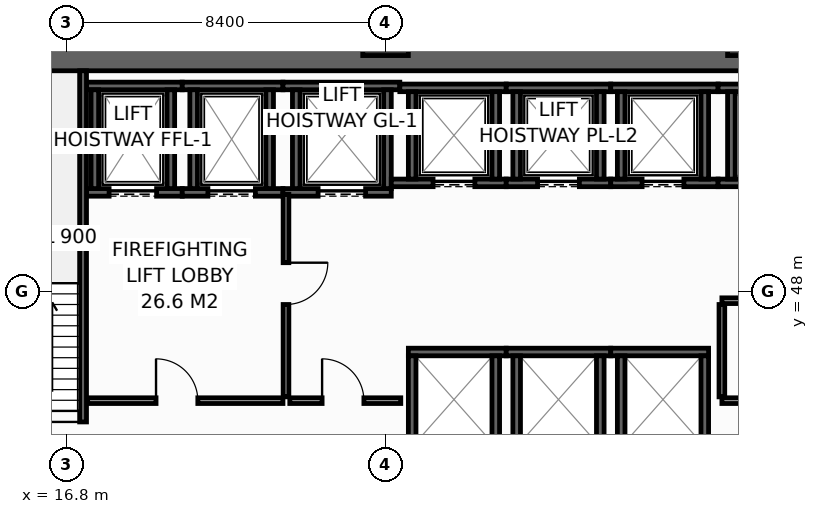
"""IFC4 building model, lengths in metres.
Left out: names, types, materials, properties, quantities, classifications, styles, units other than length and angle.
Written with IfcOpenShell. Run it as: python <this file> out.ifc"""

import sys

from ifc_helpers import new_model, si_unit, direction, frame, frame_2d, origin, origin_2d, place, context, subcontext, project, spatial, rectangle, hollow_rectangle, extrude, element, fill, save


model = new_model("IFC4")
c1 = context("Model", 3, precision=1e-05, world=origin(), true_north=direction((0.0, 1.0)))
c2 = subcontext(c1, "Body", "Model", "MODEL_VIEW")
j1 = project(units=[si_unit("LENGTHUNIT", "METRE"), si_unit("PLANEANGLEUNIT", "RADIAN")], contexts=[c1])
p1 = place(None, origin())
s1 = spatial("IfcSite", under=j1, at=p1, CompositionType="ELEMENT")
p2 = place(p1, origin())
s2 = spatial("IfcBuilding", under=s1, at=p2, CompositionType="ELEMENT")
p3 = place(p2, frame((0.0, 0.0, 82.4)))
s3 = spatial("IfcBuildingStorey", under=s2, at=p3, CompositionType="ELEMENT", Elevation=82.4)
p4 = place(p3, frame((13.5, 54.1, 0.0), z_axis=(0.0, 0.0, 1.0), x_axis=(1.0, 0.0, 0.0)))
e1 = element("IfcWall", 1, at=p4, inside=s3, PredefinedType="SHEAR", context=c2, shape_type="SweptSolid", body=[
    extrude(rectangle(XDim=32.9, YDim=0.6, at=frame_2d((16.45, 0.0))), origin(), (0.0, 0.0, 1.0), 3.95),
])
for number, where, z_axis, x_axis in (
    (2, (25.2, 54.8, 0.0), (0.0, 0.0, 1.0), (1.0, 0.0, 0.0)),
    (3, (34.8, 54.8, 0.0), (0.0, 0.0, 1.0), (1.0, 0.0, 0.0)),
):
    element("IfcColumn", number, at=place(p3, frame(where, z_axis=z_axis, x_axis=x_axis)), inside=s3, PredefinedType="COLUMN", context=c2, shape_type="SweptSolid", body=[
        extrude(hollow_rectangle(XDim=1.2, YDim=1.2, WallThickness=0.055, at=origin_2d()), origin(), (0.0, 0.0, 1.0), 4.4),
    ])
p5 = place(p3, frame((17.33, 50.6, 0.0), z_axis=(0.0, 0.0, 1.0), x_axis=(1.0, 0.0, 0.0)))
e4 = element("IfcWall", 4, at=p5, inside=s3, PredefinedType="SHEAR", context=c2, shape_type="SweptSolid", body=[
    extrude(rectangle(XDim=2.52, YDim=0.2, at=frame_2d((1.26, 0.0))), origin(), (0.0, 0.0, 1.0), 3.95),
])
p6 = place(p5, frame((0.595, 0.0, 0.0)))
e5 = element("IfcOpeningElement", 5, at=p6, cuts=e4, PredefinedType="OPENING", context=c2, shape_type="SweptSolid", body=[
    extrude(rectangle(XDim=1.25, YDim=2.3, at=frame_2d((0.625, 1.15))), frame((0.0, 0.11, 0.0), z_axis=(0.0, -1.0, 0.0), x_axis=(1.0, 0.0, 0.0)), (0.0, 0.0, 1.0), 0.22),
])
p7 = place(p3, frame((17.33, 53.4, 0.0), z_axis=(0.0, 0.0, 1.0), x_axis=(1.0, 0.0, 0.0)))
e6 = element("IfcWall", 6, at=p7, inside=s3, PredefinedType="SHEAR", context=c2, shape_type="SweptSolid", body=[
    extrude(rectangle(XDim=2.52, YDim=0.2, at=frame_2d((1.26, 0.0))), origin(), (0.0, 0.0, 1.0), 3.95),
])
for number, where, z_axis, x_axis in (
    (7, (17.55, 50.7, 0.0), (0.0, 0.0, 1.0), (0.0, 1.0, 0.0)),
    (8, (19.55, 50.7, 0.0), (0.0, 0.0, 1.0), (0.0, 1.0, 0.0)),
):
    element("IfcWall", number, at=place(p3, frame(where, z_axis=z_axis, x_axis=x_axis)), inside=s3, PredefinedType="SHEAR", context=c2, shape_type="SweptSolid", body=[
        extrude(rectangle(XDim=2.6, YDim=0.2, at=frame_2d((1.3, 0.0))), origin(), (0.0, 0.0, 1.0), 3.95),
    ])
p8 = place(p3, frame((19.85, 50.6, 0.0), z_axis=(0.0, 0.0, 1.0), x_axis=(1.0, 0.0, 0.0)))
e9 = element("IfcWall", 9, at=p8, inside=s3, PredefinedType="SHEAR", context=c2, shape_type="SweptSolid", body=[
    extrude(rectangle(XDim=2.65, YDim=0.2, at=frame_2d((1.325, 0.0))), origin(), (0.0, 0.0, 1.0), 3.95),
])
p9 = place(p8, frame((0.675, 0.0, 0.0)))
e10 = element("IfcOpeningElement", 10, at=p9, cuts=e9, PredefinedType="OPENING", context=c2, shape_type="SweptSolid", body=[
    extrude(rectangle(XDim=1.25, YDim=2.3, at=frame_2d((0.625, 1.15))), frame((0.0, 0.11, 0.0), z_axis=(0.0, -1.0, 0.0), x_axis=(1.0, 0.0, 0.0)), (0.0, 0.0, 1.0), 0.22),
])
p10 = place(p3, frame((19.85, 53.4, 0.0), z_axis=(0.0, 0.0, 1.0), x_axis=(1.0, 0.0, 0.0)))
e11 = element("IfcWall", 11, at=p10, inside=s3, PredefinedType="SHEAR", context=c2, shape_type="SweptSolid", body=[
    extrude(rectangle(XDim=2.65, YDim=0.2, at=frame_2d((1.325, 0.0))), origin(), (0.0, 0.0, 1.0), 3.95),
])
for number, where, z_axis, x_axis in (
    (12, (20.15, 50.7, 0.0), (0.0, 0.0, 1.0), (0.0, 1.0, 0.0)),
    (13, (22.15, 50.7, 0.0), (0.0, 0.0, 1.0), (0.0, 1.0, 0.0)),
):
    element("IfcWall", number, at=place(p3, frame(where, z_axis=z_axis, x_axis=x_axis)), inside=s3, PredefinedType="SHEAR", context=c2, shape_type="SweptSolid", body=[
        extrude(rectangle(XDim=2.6, YDim=0.2, at=frame_2d((1.3, 0.0))), origin(), (0.0, 0.0, 1.0), 3.95),
    ])
p11 = place(p3, frame((22.5, 50.6, 0.0), z_axis=(0.0, 0.0, 1.0), x_axis=(1.0, 0.0, 0.0)))
e14 = element("IfcWall", 14, at=p11, inside=s3, PredefinedType="SHEAR", context=c2, shape_type="SweptSolid", body=[
    extrude(rectangle(XDim=2.85, YDim=0.2, at=frame_2d((1.425, 0.0))), origin(), (0.0, 0.0, 1.0), 3.95),
])
p12 = place(p11, frame((0.925, 0.0, 0.0)))
e15 = element("IfcOpeningElement", 15, at=p12, cuts=e14, PredefinedType="OPENING", context=c2, shape_type="SweptSolid", body=[
    extrude(rectangle(XDim=1.25, YDim=2.3, at=frame_2d((0.625, 1.15))), frame((0.0, 0.11, 0.0), z_axis=(0.0, -1.0, 0.0), x_axis=(1.0, 0.0, 0.0)), (0.0, 0.0, 1.0), 0.22),
])
p13 = place(p3, frame((22.5, 53.4, 0.0), z_axis=(0.0, 0.0, 1.0), x_axis=(1.0, 0.0, 0.0)))
e16 = element("IfcWall", 16, at=p13, inside=s3, PredefinedType="SHEAR", context=c2, shape_type="SweptSolid", body=[
    extrude(rectangle(XDim=3.075, YDim=0.2, at=frame_2d((1.538, 0.0))), origin(), (0.0, 0.0, 1.0), 3.95),
])
for number, where, z_axis, x_axis in (
    (17, (22.85, 50.7, 0.0), (0.0, 0.0, 1.0), (0.0, 1.0, 0.0)),
    (18, (25.25, 50.7, 0.0), (0.0, 0.0, 1.0), (0.0, 1.0, 0.0)),
):
    element("IfcWall", number, at=place(p3, frame(where, z_axis=z_axis, x_axis=x_axis)), inside=s3, PredefinedType="SHEAR", context=c2, shape_type="SweptSolid", body=[
        extrude(rectangle(XDim=2.6, YDim=0.2, at=frame_2d((1.3, 0.0))), origin(), (0.0, 0.0, 1.0), 3.95),
    ])
p14 = place(p3, frame((25.35, 50.85, 0.0), z_axis=(0.0, 0.0, 1.0), x_axis=(1.0, 0.0, 0.0)))
e19 = element("IfcWall", 19, at=p14, inside=s3, PredefinedType="SHEAR", context=c2, shape_type="SweptSolid", body=[
    extrude(rectangle(XDim=3.025, YDim=0.2, at=frame_2d((1.512, 0.0))), origin(), (0.0, 0.0, 1.0), 3.95),
])
p15 = place(p14, frame((1.1, 0.0, 0.0)))
e20 = element("IfcOpeningElement", 20, at=p15, cuts=e19, PredefinedType="OPENING", context=c2, shape_type="SweptSolid", body=[
    extrude(rectangle(XDim=1.1, YDim=2.2, at=frame_2d((0.55, 1.1))), frame((0.0, 0.11, 0.0), z_axis=(0.0, -1.0, 0.0), x_axis=(1.0, 0.0, 0.0)), (0.0, 0.0, 1.0), 0.22),
])
p16 = place(p3, frame((25.575, 53.35, 0.0), z_axis=(0.0, 0.0, 1.0), x_axis=(1.0, 0.0, 0.0)))
e21 = element("IfcWall", 21, at=p16, inside=s3, PredefinedType="SHEAR", context=c2, shape_type="SweptSolid", body=[
    extrude(rectangle(XDim=2.8, YDim=0.2, at=frame_2d((1.4, 0.0))), origin(), (0.0, 0.0, 1.0), 3.95),
])
for number, where, z_axis, x_axis in (
    (22, (25.9, 50.95, 0.0), (0.0, 0.0, 1.0), (0.0, 1.0, 0.0)),
    (23, (28.1, 50.95, 0.0), (0.0, 0.0, 1.0), (0.0, 1.0, 0.0)),
):
    element("IfcWall", number, at=place(p3, frame(where, z_axis=z_axis, x_axis=x_axis)), inside=s3, PredefinedType="SHEAR", context=c2, shape_type="SweptSolid", body=[
        extrude(rectangle(XDim=2.3, YDim=0.2, at=frame_2d((1.15, 0.0))), origin(), (0.0, 0.0, 1.0), 3.95),
    ])
p17 = place(p3, frame((28.375, 50.85, 0.0), z_axis=(0.0, 0.0, 1.0), x_axis=(1.0, 0.0, 0.0)))
e24 = element("IfcWall", 24, at=p17, inside=s3, PredefinedType="SHEAR", context=c2, shape_type="SweptSolid", body=[
    extrude(rectangle(XDim=2.75, YDim=0.2, at=frame_2d((1.375, 0.0))), origin(), (0.0, 0.0, 1.0), 3.95),
])
p18 = place(p17, frame((0.825, 0.0, 0.0)))
e25 = element("IfcOpeningElement", 25, at=p18, cuts=e24, PredefinedType="OPENING", context=c2, shape_type="SweptSolid", body=[
    extrude(rectangle(XDim=1.1, YDim=2.2, at=frame_2d((0.55, 1.1))), frame((0.0, 0.11, 0.0), z_axis=(0.0, -1.0, 0.0), x_axis=(1.0, 0.0, 0.0)), (0.0, 0.0, 1.0), 0.22),
])
p19 = place(p3, frame((28.375, 53.35, 0.0), z_axis=(0.0, 0.0, 1.0), x_axis=(1.0, 0.0, 0.0)))
e26 = element("IfcWall", 26, at=p19, inside=s3, PredefinedType="SHEAR", context=c2, shape_type="SweptSolid", body=[
    extrude(rectangle(XDim=2.75, YDim=0.2, at=frame_2d((1.375, 0.0))), origin(), (0.0, 0.0, 1.0), 3.95),
])
for number, where, z_axis, x_axis in (
    (27, (28.65, 50.95, 0.0), (0.0, 0.0, 1.0), (0.0, 1.0, 0.0)),
    (28, (30.85, 50.95, 0.0), (0.0, 0.0, 1.0), (0.0, 1.0, 0.0)),
):
    element("IfcWall", number, at=place(p3, frame(where, z_axis=z_axis, x_axis=x_axis)), inside=s3, PredefinedType="SHEAR", context=c2, shape_type="SweptSolid", body=[
        extrude(rectangle(XDim=2.3, YDim=0.2, at=frame_2d((1.15, 0.0))), origin(), (0.0, 0.0, 1.0), 3.95),
    ])
p20 = place(p3, frame((31.125, 50.85, 0.0), z_axis=(0.0, 0.0, 1.0), x_axis=(1.0, 0.0, 0.0)))
e29 = element("IfcWall", 29, at=p20, inside=s3, PredefinedType="SHEAR", context=c2, shape_type="SweptSolid", body=[
    extrude(rectangle(XDim=2.825, YDim=0.2, at=frame_2d((1.413, 0.0))), origin(), (0.0, 0.0, 1.0), 3.95),
])
p21 = place(p20, frame((0.825, 0.0, 0.0)))
e30 = element("IfcOpeningElement", 30, at=p21, cuts=e29, PredefinedType="OPENING", context=c2, shape_type="SweptSolid", body=[
    extrude(rectangle(XDim=1.1, YDim=2.2, at=frame_2d((0.55, 1.1))), frame((0.0, 0.11, 0.0), z_axis=(0.0, -1.0, 0.0), x_axis=(1.0, 0.0, 0.0)), (0.0, 0.0, 1.0), 0.22),
])
p22 = place(p3, frame((31.125, 53.35, 0.0), z_axis=(0.0, 0.0, 1.0), x_axis=(1.0, 0.0, 0.0)))
e31 = element("IfcWall", 31, at=p22, inside=s3, PredefinedType="SHEAR", context=c2, shape_type="SweptSolid", body=[
    extrude(rectangle(XDim=2.825, YDim=0.2, at=frame_2d((1.413, 0.0))), origin(), (0.0, 0.0, 1.0), 3.95),
])
for number, where, z_axis, x_axis in (
    (32, (31.4, 50.95, 0.0), (0.0, 0.0, 1.0), (0.0, 1.0, 0.0)),
    (33, (33.6, 50.95, 0.0), (0.0, 0.0, 1.0), (0.0, 1.0, 0.0)),
):
    element("IfcWall", number, at=place(p3, frame(where, z_axis=z_axis, x_axis=x_axis)), inside=s3, PredefinedType="SHEAR", context=c2, shape_type="SweptSolid", body=[
        extrude(rectangle(XDim=2.3, YDim=0.2, at=frame_2d((1.15, 0.0))), origin(), (0.0, 0.0, 1.0), 3.95),
    ])
p23 = place(p3, frame((25.8, 46.4, 0.0), z_axis=(0.0, 0.0, 1.0), x_axis=(1.0, 0.0, 0.0)))
e34 = element("IfcWall", 34, at=p23, inside=s3, PredefinedType="SHEAR", context=c2, shape_type="SweptSolid", body=[
    extrude(rectangle(XDim=2.575, YDim=0.2, at=frame_2d((1.288, 0.0))), origin(), (0.0, 0.0, 1.0), 3.95),
])
for number, where, z_axis, x_axis in (
    (35, (25.9, 44.0, 0.0), (0.0, 0.0, 1.0), (0.0, 1.0, 0.0)),
    (36, (28.1, 44.0, 0.0), (0.0, 0.0, 1.0), (0.0, 1.0, 0.0)),
):
    element("IfcWall", number, at=place(p3, frame(where, z_axis=z_axis, x_axis=x_axis)), inside=s3, PredefinedType="SHEAR", context=c2, shape_type="SweptSolid", body=[
        extrude(rectangle(XDim=2.3, YDim=0.2, at=frame_2d((1.15, 0.0))), origin(), (0.0, 0.0, 1.0), 3.95),
    ])
p24 = place(p3, frame((28.375, 46.4, 0.0), z_axis=(0.0, 0.0, 1.0), x_axis=(1.0, 0.0, 0.0)))
e37 = element("IfcWall", 37, at=p24, inside=s3, PredefinedType="SHEAR", context=c2, shape_type="SweptSolid", body=[
    extrude(rectangle(XDim=2.75, YDim=0.2, at=frame_2d((1.375, 0.0))), origin(), (0.0, 0.0, 1.0), 3.95),
])
for number, where, z_axis, x_axis in (
    (38, (28.65, 44.0, 0.0), (0.0, 0.0, 1.0), (0.0, 1.0, 0.0)),
    (39, (30.85, 44.0, 0.0), (0.0, 0.0, 1.0), (0.0, 1.0, 0.0)),
):
    element("IfcWall", number, at=place(p3, frame(where, z_axis=z_axis, x_axis=x_axis)), inside=s3, PredefinedType="SHEAR", context=c2, shape_type="SweptSolid", body=[
        extrude(rectangle(XDim=2.3, YDim=0.2, at=frame_2d((1.15, 0.0))), origin(), (0.0, 0.0, 1.0), 3.95),
    ])
p25 = place(p3, frame((31.125, 46.4, 0.0), z_axis=(0.0, 0.0, 1.0), x_axis=(1.0, 0.0, 0.0)))
e40 = element("IfcWall", 40, at=p25, inside=s3, PredefinedType="SHEAR", context=c2, shape_type="SweptSolid", body=[
    extrude(rectangle(XDim=2.575, YDim=0.2, at=frame_2d((1.288, 0.0))), origin(), (0.0, 0.0, 1.0), 3.95),
])
for number, where, z_axis, x_axis in (
    (41, (31.4, 44.0, 0.0), (0.0, 0.0, 1.0), (0.0, 1.0, 0.0)),
    (42, (33.6, 44.0, 0.0), (0.0, 0.0, 1.0), (0.0, 1.0, 0.0)),
):
    element("IfcWall", number, at=place(p3, frame(where, z_axis=z_axis, x_axis=x_axis)), inside=s3, PredefinedType="SHEAR", context=c2, shape_type="SweptSolid", body=[
        extrude(rectangle(XDim=2.3, YDim=0.2, at=frame_2d((1.15, 0.0))), origin(), (0.0, 0.0, 1.0), 3.95),
    ])
for number, where, z_axis, x_axis in (
    (43, (33.95, 50.85, 0.0), (0.0, 0.0, 1.0), (1.0, 0.0, 0.0)),
    (44, (33.95, 53.35, 0.0), (0.0, 0.0, 1.0), (1.0, 0.0, 0.0)),
):
    element("IfcWall", number, at=place(p3, frame(where, z_axis=z_axis, x_axis=x_axis)), inside=s3, PredefinedType="SHEAR", context=c2, shape_type="SweptSolid", body=[
        extrude(rectangle(XDim=2.825, YDim=0.2, at=frame_2d((1.413, 0.0))), origin(), (0.0, 0.0, 1.0), 3.95),
    ])
p26 = place(p3, frame((34.3, 50.95, 0.0), z_axis=(0.0, 0.0, 1.0), x_axis=(0.0, 1.0, 0.0)))
e45 = element("IfcWall", 45, at=p26, inside=s3, PredefinedType="SHEAR", context=c2, shape_type="SweptSolid", body=[
    extrude(rectangle(XDim=2.3, YDim=0.2, at=frame_2d((1.15, 0.0))), origin(), (0.0, 0.0, 1.0), 3.95),
])
p27 = place(p3, frame((17.24, 43.4, 0.0), z_axis=(0.0, 0.0, 1.0), x_axis=(0.0, 1.0, 0.0)))
e46 = element("IfcWall", 46, at=p27, inside=s3, PredefinedType="SHEAR", context=c2, shape_type="SweptSolid", body=[
    extrude(rectangle(XDim=10.4, YDim=0.18, at=frame_2d((5.2, 0.0))), origin(), (0.0, 0.0, 1.0), 3.95),
])
p28 = place(p27, frame((0.16, 0.0, 0.0)))
e47 = element("IfcOpeningElement", 47, at=p28, cuts=e46, PredefinedType="OPENING", context=c2, shape_type="SweptSolid", body=[
    extrude(rectangle(XDim=1.0, YDim=2.15, at=frame_2d((0.5, 1.075))), frame((0.0, 0.1, 0.0), z_axis=(0.0, -1.0, 0.0), x_axis=(1.0, 0.0, 0.0)), (0.0, 0.0, 1.0), 0.2),
])
p29 = place(p3, frame((17.36, 45.12, 0.0), z_axis=(0.0, 0.0, 1.0), x_axis=(1.0, 0.0, 0.0)))
e48 = element("IfcWall", 48, at=p29, inside=s3, PredefinedType="PARTITIONING", context=c2, shape_type="SweptSolid", body=[
    extrude(rectangle(XDim=5.14, YDim=0.15, at=frame_2d((2.57, 0.0))), origin(), (0.0, 0.0, 1.0), 3.95),
])
p30 = place(p29, frame((1.8, 0.0, 0.0)))
e49 = element("IfcOpeningElement", 49, at=p30, cuts=e48, PredefinedType="OPENING", context=c2, shape_type="SweptSolid", body=[
    extrude(rectangle(XDim=1.1, YDim=2.15, at=frame_2d((0.55, 1.075))), frame((0.0, 0.085, 0.0), z_axis=(0.0, -1.0, 0.0), x_axis=(1.0, 0.0, 0.0)), (0.0, 0.0, 1.0), 0.17),
])
p31 = place(p3, frame((22.58, 50.55, 0.0), z_axis=(0.0, 0.0, 1.0), x_axis=(0.0, -1.0, 0.0)))
e50 = element("IfcWall", 50, at=p31, inside=s3, PredefinedType="PARTITIONING", context=c2, shape_type="SweptSolid", body=[
    extrude(rectangle(XDim=5.33, YDim=0.15, at=frame_2d((2.665, 0.0))), origin(), (0.0, 0.0, 1.0), 3.95),
])
p32 = place(p31, frame((1.8, 0.0, 0.0)))
e51 = element("IfcOpeningElement", 51, at=p32, cuts=e50, PredefinedType="OPENING", context=c2, shape_type="SweptSolid", body=[
    extrude(rectangle(XDim=1.1, YDim=2.15, at=frame_2d((0.55, 1.075))), frame((0.0, 0.085, 0.0), z_axis=(0.0, -1.0, 0.0), x_axis=(1.0, 0.0, 0.0)), (0.0, 0.0, 1.0), 0.17),
])
p33 = place(p3, frame((22.68, 45.12, 0.0), z_axis=(0.0, 0.0, 1.0), x_axis=(1.0, 0.0, 0.0)))
e52 = element("IfcWall", 52, at=p33, inside=s3, PredefinedType="PARTITIONING", context=c2, shape_type="SweptSolid", body=[
    extrude(rectangle(XDim=2.92, YDim=0.15, at=frame_2d((1.46, 0.0))), origin(), (0.0, 0.0, 1.0), 3.95),
])
p34 = place(p33, frame((0.85, 0.0, 0.0)))
e53 = element("IfcOpeningElement", 53, at=p34, cuts=e52, PredefinedType="OPENING", context=c2, shape_type="SweptSolid", body=[
    extrude(rectangle(XDim=1.1, YDim=2.15, at=frame_2d((0.55, 1.075))), frame((0.0, 0.085, 0.0), z_axis=(0.0, -1.0, 0.0), x_axis=(1.0, 0.0, 0.0)), (0.0, 0.0, 1.0), 0.17),
])
p35 = place(p3, frame((34.05, 45.12, 0.0), z_axis=(0.0, 0.0, 1.0), x_axis=(1.0, 0.0, 0.0)))
e54 = element("IfcWall", 54, at=p35, inside=s3, PredefinedType="PARTITIONING", context=c2, shape_type="SweptSolid", body=[
    extrude(rectangle(XDim=8.45, YDim=0.15, at=frame_2d((4.225, 0.0))), origin(), (0.0, 0.0, 1.0), 3.95),
])
p36 = place(p35, frame((3.6, 0.0, 0.0)))
e55 = element("IfcOpeningElement", 55, at=p36, cuts=e54, PredefinedType="OPENING", context=c2, shape_type="SweptSolid", body=[
    extrude(rectangle(XDim=0.95, YDim=2.15, at=frame_2d((0.475, 1.075))), frame((0.0, 0.085, 0.0), z_axis=(0.0, -1.0, 0.0), x_axis=(1.0, 0.0, 0.0)), (0.0, 0.0, 1.0), 0.17),
])
p37 = place(p3, frame((34.05, 47.75, 0.0), z_axis=(0.0, 0.0, 1.0), x_axis=(1.0, 0.0, 0.0)))
e56 = element("IfcWall", 56, at=p37, inside=s3, PredefinedType="PARTITIONING", context=c2, shape_type="SweptSolid", body=[
    extrude(rectangle(XDim=8.45, YDim=0.15, at=frame_2d((4.225, 0.0))), origin(), (0.0, 0.0, 1.0), 3.95),
])
p38 = place(p3, frame((34.05, 45.22, 0.0), z_axis=(0.0, 0.0, 1.0), x_axis=(0.0, 1.0, 0.0)))
e57 = element("IfcWall", 57, at=p38, inside=s3, PredefinedType="PARTITIONING", context=c2, shape_type="SweptSolid", body=[
    extrude(rectangle(XDim=2.43, YDim=0.15, at=frame_2d((1.215, 0.0))), origin(), (0.0, 0.0, 1.0), 3.95),
])
p39 = place(p6, origin())
e58 = element("IfcDoor", 58, at=p39, inside=s3, OperationType="SLIDING_TO_LEFT", PredefinedType="DOOR", context=c2, shape_type="SweptSolid", body=[
    extrude(rectangle(XDim=1.25, YDim=2.3, at=frame_2d((0.625, 1.15))), frame((0.0, 0.025, 0.0), z_axis=(0.0, -1.0, 0.0), x_axis=(1.0, 0.0, 0.0)), (0.0, 0.0, 1.0), 0.05),
])
fill(e5, e58)
p40 = place(p9, origin())
e59 = element("IfcDoor", 59, at=p40, inside=s3, OperationType="SLIDING_TO_LEFT", PredefinedType="DOOR", context=c2, shape_type="SweptSolid", body=[
    extrude(rectangle(XDim=1.25, YDim=2.3, at=frame_2d((0.625, 1.15))), frame((0.0, 0.025, 0.0), z_axis=(0.0, -1.0, 0.0), x_axis=(1.0, 0.0, 0.0)), (0.0, 0.0, 1.0), 0.05),
])
fill(e10, e59)
p41 = place(p12, origin())
e60 = element("IfcDoor", 60, at=p41, inside=s3, OperationType="SLIDING_TO_LEFT", PredefinedType="DOOR", context=c2, shape_type="SweptSolid", body=[
    extrude(rectangle(XDim=1.25, YDim=2.3, at=frame_2d((0.625, 1.15))), frame((0.0, 0.025, 0.0), z_axis=(0.0, -1.0, 0.0), x_axis=(1.0, 0.0, 0.0)), (0.0, 0.0, 1.0), 0.05),
])
fill(e15, e60)
p42 = place(p15, origin())
e61 = element("IfcDoor", 61, at=p42, inside=s3, OperationType="SLIDING_TO_LEFT", PredefinedType="DOOR", context=c2, shape_type="SweptSolid", body=[
    extrude(rectangle(XDim=1.1, YDim=2.2, at=frame_2d((0.55, 1.1))), frame((0.0, 0.025, 0.0), z_axis=(0.0, -1.0, 0.0), x_axis=(1.0, 0.0, 0.0)), (0.0, 0.0, 1.0), 0.05),
])
fill(e20, e61)
p43 = place(p18, origin())
e62 = element("IfcDoor", 62, at=p43, inside=s3, OperationType="SLIDING_TO_LEFT", PredefinedType="DOOR", context=c2, shape_type="SweptSolid", body=[
    extrude(rectangle(XDim=1.1, YDim=2.2, at=frame_2d((0.55, 1.1))), frame((0.0, 0.025, 0.0), z_axis=(0.0, -1.0, 0.0), x_axis=(1.0, 0.0, 0.0)), (0.0, 0.0, 1.0), 0.05),
])
fill(e25, e62)
p44 = place(p21, origin())
e63 = element("IfcDoor", 63, at=p44, inside=s3, OperationType="SLIDING_TO_LEFT", PredefinedType="DOOR", context=c2, shape_type="SweptSolid", body=[
    extrude(rectangle(XDim=1.1, YDim=2.2, at=frame_2d((0.55, 1.1))), frame((0.0, 0.025, 0.0), z_axis=(0.0, -1.0, 0.0), x_axis=(1.0, 0.0, 0.0)), (0.0, 0.0, 1.0), 0.05),
])
fill(e30, e63)
p45 = place(p28, origin())
e64 = element("IfcDoor", 64, at=p45, inside=s3, OperationType="SINGLE_SWING_RIGHT", PredefinedType="DOOR", context=c2, shape_type="SweptSolid", body=[
    extrude(rectangle(XDim=1.0, YDim=2.15, at=frame_2d((0.5, 1.075))), frame((0.0, 0.025, 0.0), z_axis=(0.0, -1.0, 0.0), x_axis=(1.0, 0.0, 0.0)), (0.0, 0.0, 1.0), 0.05),
])
fill(e47, e64)
p46 = place(p30, origin())
e65 = element("IfcDoor", 65, at=p46, inside=s3, OperationType="SINGLE_SWING_LEFT", PredefinedType="DOOR", context=c2, shape_type="SweptSolid", body=[
    extrude(rectangle(XDim=1.1, YDim=2.15, at=frame_2d((0.55, 1.075))), frame((0.0, 0.025, 0.0), z_axis=(0.0, -1.0, 0.0), x_axis=(1.0, 0.0, 0.0)), (0.0, 0.0, 1.0), 0.05),
])
fill(e49, e65)
p47 = place(p32, origin())
e66 = element("IfcDoor", 66, at=p47, inside=s3, OperationType="SINGLE_SWING_LEFT", PredefinedType="DOOR", context=c2, shape_type="SweptSolid", body=[
    extrude(rectangle(XDim=1.1, YDim=2.15, at=frame_2d((0.55, 1.075))), frame((0.0, 0.025, 0.0), z_axis=(0.0, -1.0, 0.0), x_axis=(1.0, 0.0, 0.0)), (0.0, 0.0, 1.0), 0.05),
])
fill(e51, e66)
p48 = place(p34, origin())
e67 = element("IfcDoor", 67, at=p48, inside=s3, OperationType="SINGLE_SWING_LEFT", PredefinedType="DOOR", context=c2, shape_type="SweptSolid", body=[
    extrude(rectangle(XDim=1.1, YDim=2.15, at=frame_2d((0.55, 1.075))), frame((0.0, 0.025, 0.0), z_axis=(0.0, -1.0, 0.0), x_axis=(1.0, 0.0, 0.0)), (0.0, 0.0, 1.0), 0.05),
])
fill(e53, e67)
save(model, sys.argv[1])
